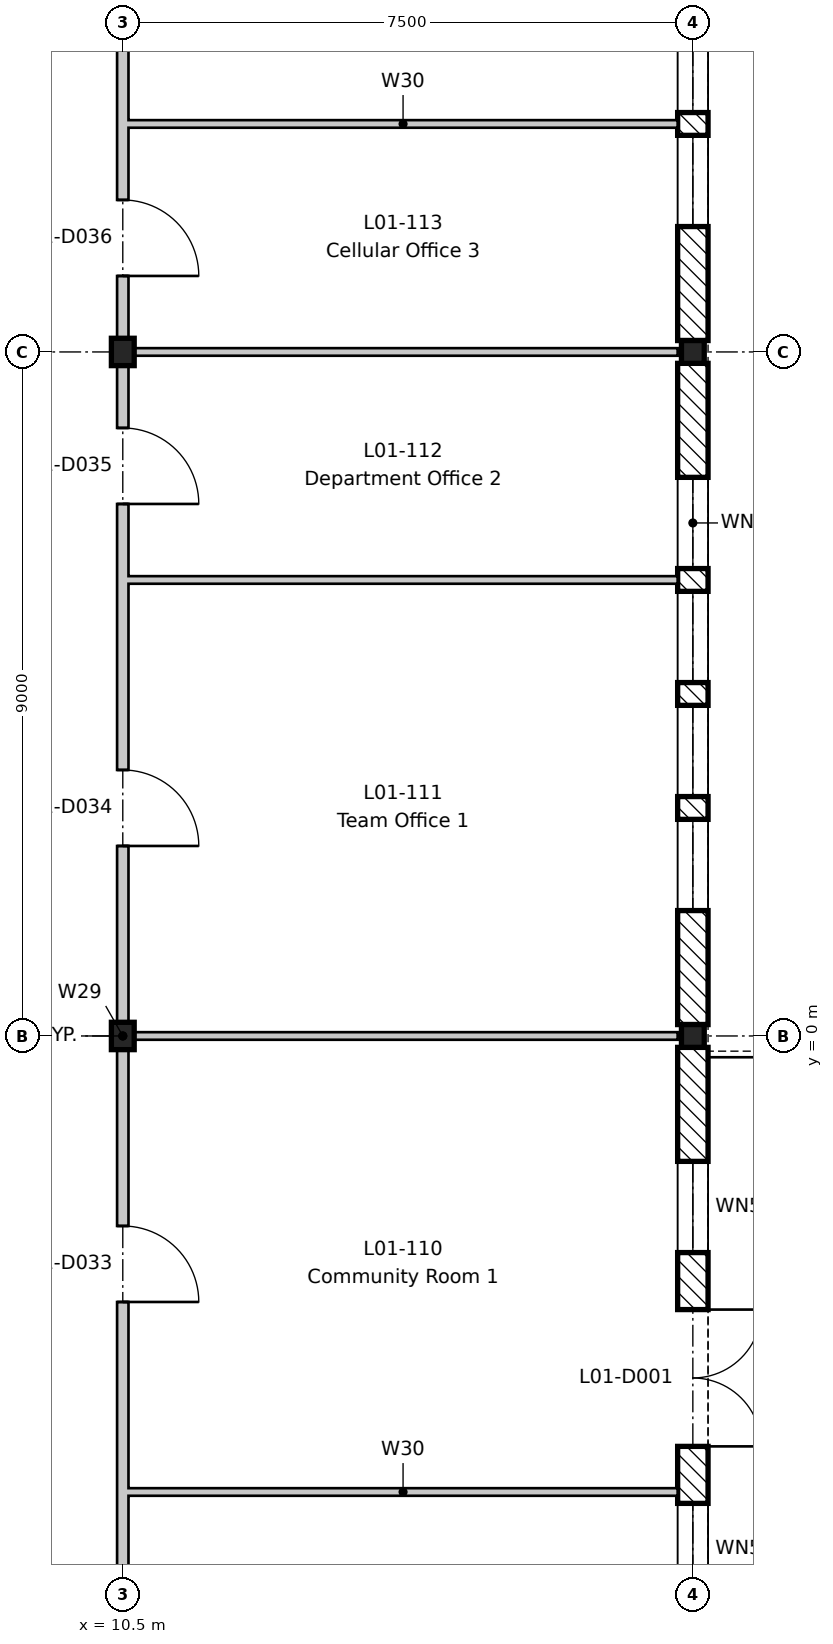
"""IFC4 building model, lengths in metres.
Left out: names, types, materials, properties, quantities, classifications, styles, units other than length and angle.
Written with IfcOpenShell. Run it as: python <this file> out.ifc"""

import sys

from ifc_helpers import new_model, si_unit, direction, frame, frame_2d, origin, origin_2d, place, context, subcontext, project, spatial, rectangle, i_section, extrude, element, fill, save


model = new_model("IFC4")
c1 = context("Model", 3, precision=1e-05, world=origin(), true_north=direction((0.0, 1.0)))
c2 = subcontext(c1, "Body", "Model", "MODEL_VIEW")
j1 = project(units=[si_unit("LENGTHUNIT", "METRE"), si_unit("PLANEANGLEUNIT", "RADIAN")], contexts=[c1])
p1 = place(None, origin())
s1 = spatial("IfcSite", under=j1, at=p1, CompositionType="ELEMENT")
p2 = place(p1, origin())
s2 = spatial("IfcBuilding", under=s1, at=p2, CompositionType="ELEMENT")
p3 = place(p2, frame((0.0, 0.0, 5.4)))
s3 = spatial("IfcBuildingStorey", under=s2, at=p3, CompositionType="ELEMENT", Elevation=5.4)
for number, where, z_axis, x_axis in (
    (1, (10.5, 0.0, -0.2), (0.0, 0.0, 1.0), (1.0, 0.0, 0.0)),
    (2, (10.5, 9.0, -0.2), (0.0, 0.0, 1.0), (1.0, 0.0, 0.0)),
):
    element("IfcColumn", number, at=place(p3, frame(where, z_axis=z_axis, x_axis=x_axis)), inside=s3, PredefinedType="COLUMN", context=c2, shape_type="SweptSolid", body=[
        extrude(i_section(OverallWidth=0.3, OverallDepth=0.36, WebThickness=0.012, FlangeThickness=0.022, FilletRadius=0.027, at=origin_2d()), origin(), (0.0, 0.0, 1.0), 4.5),
    ])
for number, where, z_axis, x_axis in (
    (3, (18.0, 0.0, -0.2), (0.0, 0.0, 1.0), (1.0, 0.0, 0.0)),
    (4, (18.0, 9.0, -0.2), (0.0, 0.0, 1.0), (1.0, 0.0, 0.0)),
):
    element("IfcColumn", number, at=place(p3, frame(where, z_axis=z_axis, x_axis=x_axis)), inside=s3, PredefinedType="COLUMN", context=c2, shape_type="SweptSolid", body=[
        extrude(i_section(OverallWidth=0.3, OverallDepth=0.3, WebThickness=0.011, FlangeThickness=0.019, FilletRadius=0.027, at=origin_2d()), origin(), (0.0, 0.0, 1.0), 4.5),
    ])
p4 = place(p3, frame((18.0, -0.15, 0.0), z_axis=(0.0, 0.0, 1.0), x_axis=(0.0, -1.0, 0.0)))
e5 = element("IfcWall", 5, at=p4, inside=s3, PredefinedType="STANDARD", context=c2, shape_type="SweptSolid", body=[
    extrude(rectangle(XDim=8.7, YDim=0.4, at=frame_2d((4.35, 0.0))), origin(), (0.0, 0.0, 1.0), 3.9),
])
p5 = place(p4, frame((3.45, 0.0, 0.0)))
e6 = element("IfcOpeningElement", 6, at=p5, cuts=e5, PredefinedType="OPENING", context=c2, shape_type="SweptSolid", body=[
    extrude(rectangle(XDim=1.8, YDim=2.4, at=frame_2d((0.9, 1.2))), frame((0.0, 0.21, 0.0), z_axis=(0.0, -1.0, 0.0), x_axis=(1.0, 0.0, 0.0)), (0.0, 0.0, 1.0), 0.42),
])
p6 = place(p4, frame((6.0, 0.0, 0.6)))
e7 = element("IfcOpeningElement", 7, at=p6, cuts=e5, PredefinedType="OPENING", context=c2, shape_type="SweptSolid", body=[
    extrude(rectangle(XDim=1.2, YDim=3.0, at=frame_2d((0.6, 1.5))), frame((0.0, 0.21, 0.0), z_axis=(0.0, -1.0, 0.0), x_axis=(1.0, 0.0, 0.0)), (0.0, 0.0, 1.0), 0.42),
])
p7 = place(p4, frame((1.5, 0.0, 0.6)))
e8 = element("IfcOpeningElement", 8, at=p7, cuts=e5, PredefinedType="OPENING", context=c2, shape_type="SweptSolid", body=[
    extrude(rectangle(XDim=1.2, YDim=3.0, at=frame_2d((0.6, 1.5))), frame((0.0, 0.21, 0.0), z_axis=(0.0, -1.0, 0.0), x_axis=(1.0, 0.0, 0.0)), (0.0, 0.0, 1.0), 0.42),
])
p8 = place(p3, frame((18.0, 8.85, 0.0), z_axis=(0.0, 0.0, 1.0), x_axis=(0.0, -1.0, 0.0)))
e9 = element("IfcWall", 9, at=p8, inside=s3, PredefinedType="STANDARD", context=c2, shape_type="SweptSolid", body=[
    extrude(rectangle(XDim=8.7, YDim=0.4, at=frame_2d((4.35, 0.0))), origin(), (0.0, 0.0, 1.0), 3.9),
])
p9 = place(p8, frame((6.0, 0.0, 0.6)))
e10 = element("IfcOpeningElement", 10, at=p9, cuts=e9, PredefinedType="OPENING", context=c2, shape_type="SweptSolid", body=[
    extrude(rectangle(XDim=1.2, YDim=3.0, at=frame_2d((0.6, 1.5))), frame((0.0, 0.21, 0.0), z_axis=(0.0, -1.0, 0.0), x_axis=(1.0, 0.0, 0.0)), (0.0, 0.0, 1.0), 0.42),
])
p10 = place(p8, frame((4.5, 0.0, 0.6)))
e11 = element("IfcOpeningElement", 11, at=p10, cuts=e9, PredefinedType="OPENING", context=c2, shape_type="SweptSolid", body=[
    extrude(rectangle(XDim=1.2, YDim=3.0, at=frame_2d((0.6, 1.5))), frame((0.0, 0.21, 0.0), z_axis=(0.0, -1.0, 0.0), x_axis=(1.0, 0.0, 0.0)), (0.0, 0.0, 1.0), 0.42),
])
p11 = place(p8, frame((3.0, 0.0, 0.6)))
e12 = element("IfcOpeningElement", 12, at=p11, cuts=e9, PredefinedType="OPENING", context=c2, shape_type="SweptSolid", body=[
    extrude(rectangle(XDim=1.2, YDim=3.0, at=frame_2d((0.6, 1.5))), frame((0.0, 0.21, 0.0), z_axis=(0.0, -1.0, 0.0), x_axis=(1.0, 0.0, 0.0)), (0.0, 0.0, 1.0), 0.42),
])
p12 = place(p8, frame((1.5, 0.0, 0.6)))
e13 = element("IfcOpeningElement", 13, at=p12, cuts=e9, PredefinedType="OPENING", context=c2, shape_type="SweptSolid", body=[
    extrude(rectangle(XDim=1.2, YDim=3.0, at=frame_2d((0.6, 1.5))), frame((0.0, 0.21, 0.0), z_axis=(0.0, -1.0, 0.0), x_axis=(1.0, 0.0, 0.0)), (0.0, 0.0, 1.0), 0.42),
])
p13 = place(p3, frame((18.0, 17.85, 0.0), z_axis=(0.0, 0.0, 1.0), x_axis=(0.0, -1.0, 0.0)))
e14 = element("IfcWall", 14, at=p13, inside=s3, PredefinedType="STANDARD", context=c2, shape_type="SweptSolid", body=[
    extrude(rectangle(XDim=8.7, YDim=0.4, at=frame_2d((4.35, 0.0))), origin(), (0.0, 0.0, 1.0), 3.9),
])
p14 = place(p13, frame((6.0, 0.0, 0.6)))
e15 = element("IfcOpeningElement", 15, at=p14, cuts=e14, PredefinedType="OPENING", context=c2, shape_type="SweptSolid", body=[
    extrude(rectangle(XDim=1.2, YDim=3.0, at=frame_2d((0.6, 1.5))), frame((0.0, 0.21, 0.0), z_axis=(0.0, -1.0, 0.0), x_axis=(1.0, 0.0, 0.0)), (0.0, 0.0, 1.0), 0.42),
])
p15 = place(p13, frame((4.5, 0.0, 0.6)))
e16 = element("IfcOpeningElement", 16, at=p15, cuts=e14, PredefinedType="OPENING", context=c2, shape_type="SweptSolid", body=[
    extrude(rectangle(XDim=1.2, YDim=3.0, at=frame_2d((0.6, 1.5))), frame((0.0, 0.21, 0.0), z_axis=(0.0, -1.0, 0.0), x_axis=(1.0, 0.0, 0.0)), (0.0, 0.0, 1.0), 0.42),
])
p16 = place(p13, frame((3.0, 0.0, 0.6)))
e17 = element("IfcOpeningElement", 17, at=p16, cuts=e14, PredefinedType="OPENING", context=c2, shape_type="SweptSolid", body=[
    extrude(rectangle(XDim=1.2, YDim=3.0, at=frame_2d((0.6, 1.5))), frame((0.0, 0.21, 0.0), z_axis=(0.0, -1.0, 0.0), x_axis=(1.0, 0.0, 0.0)), (0.0, 0.0, 1.0), 0.42),
])
p17 = place(p13, frame((1.5, 0.0, 0.6)))
e18 = element("IfcOpeningElement", 18, at=p17, cuts=e14, PredefinedType="OPENING", context=c2, shape_type="SweptSolid", body=[
    extrude(rectangle(XDim=1.2, YDim=3.0, at=frame_2d((0.6, 1.5))), frame((0.0, 0.21, 0.0), z_axis=(0.0, -1.0, 0.0), x_axis=(1.0, 0.0, 0.0)), (0.0, 0.0, 1.0), 0.42),
])
p18 = place(p3, frame((10.575, -6.0, 0.0), z_axis=(0.0, 0.0, 1.0), x_axis=(1.0, 0.0, 0.0)))
e19 = element("IfcWall", 19, at=p18, inside=s3, PredefinedType="PARTITIONING", context=c2, shape_type="SweptSolid", body=[
    extrude(rectangle(XDim=7.225, YDim=0.1, at=frame_2d((3.613, 0.0))), origin(), (0.0, 0.0, 1.0), 4.3),
])
p19 = place(p3, frame((10.575, 0.0, 0.0), z_axis=(0.0, 0.0, 1.0), x_axis=(1.0, 0.0, 0.0)))
e20 = element("IfcWall", 20, at=p19, inside=s3, PredefinedType="PARTITIONING", context=c2, shape_type="SweptSolid", body=[
    extrude(rectangle(XDim=7.225, YDim=0.1, at=frame_2d((3.613, 0.0))), origin(), (0.0, 0.0, 1.0), 3.95),
])
p20 = place(p3, frame((10.575, 6.0, 0.0), z_axis=(0.0, 0.0, 1.0), x_axis=(1.0, 0.0, 0.0)))
e21 = element("IfcWall", 21, at=p20, inside=s3, PredefinedType="PARTITIONING", context=c2, shape_type="SweptSolid", body=[
    extrude(rectangle(XDim=7.225, YDim=0.1, at=frame_2d((3.613, 0.0))), origin(), (0.0, 0.0, 1.0), 4.3),
])
p21 = place(p3, frame((10.575, 9.0, 0.0), z_axis=(0.0, 0.0, 1.0), x_axis=(1.0, 0.0, 0.0)))
e22 = element("IfcWall", 22, at=p21, inside=s3, PredefinedType="PARTITIONING", context=c2, shape_type="SweptSolid", body=[
    extrude(rectangle(XDim=7.225, YDim=0.1, at=frame_2d((3.613, 0.0))), origin(), (0.0, 0.0, 1.0), 3.95),
])
p22 = place(p3, frame((10.575, 12.0, 0.0), z_axis=(0.0, 0.0, 1.0), x_axis=(1.0, 0.0, 0.0)))
e23 = element("IfcWall", 23, at=p22, inside=s3, PredefinedType="PARTITIONING", context=c2, shape_type="SweptSolid", body=[
    extrude(rectangle(XDim=7.225, YDim=0.1, at=frame_2d((3.613, 0.0))), origin(), (0.0, 0.0, 1.0), 4.3),
])
p23 = place(p3, frame((10.5, -8.8, 0.0), z_axis=(0.0, 0.0, 1.0), x_axis=(0.0, 1.0, 0.0)))
e24 = element("IfcWall", 24, at=p23, inside=s3, PredefinedType="PARTITIONING", context=c2, shape_type="SweptSolid", body=[
    extrude(rectangle(XDim=79.3, YDim=0.15, at=frame_2d((39.65, 0.0))), origin(), (0.0, 0.0, 1.0), 3.78),
])
p24 = place(p23, frame((0.8, 0.0, 0.0)))
e25 = element("IfcOpeningElement", 25, at=p24, cuts=e24, PredefinedType="OPENING", context=c2, shape_type="SweptSolid", body=[
    extrude(rectangle(XDim=1.0, YDim=2.1, at=frame_2d((0.5, 1.05))), frame((0.0, 0.085, 0.0), z_axis=(0.0, -1.0, 0.0), x_axis=(1.0, 0.0, 0.0)), (0.0, 0.0, 1.0), 0.17),
])
p25 = place(p23, frame((5.3, 0.0, 0.0)))
e26 = element("IfcOpeningElement", 26, at=p25, cuts=e24, PredefinedType="OPENING", context=c2, shape_type="SweptSolid", body=[
    extrude(rectangle(XDim=1.0, YDim=2.1, at=frame_2d((0.5, 1.05))), frame((0.0, 0.085, 0.0), z_axis=(0.0, -1.0, 0.0), x_axis=(1.0, 0.0, 0.0)), (0.0, 0.0, 1.0), 0.17),
])
p26 = place(p23, frame((11.3, 0.0, 0.0)))
e27 = element("IfcOpeningElement", 27, at=p26, cuts=e24, PredefinedType="OPENING", context=c2, shape_type="SweptSolid", body=[
    extrude(rectangle(XDim=1.0, YDim=2.1, at=frame_2d((0.5, 1.05))), frame((0.0, 0.085, 0.0), z_axis=(0.0, -1.0, 0.0), x_axis=(1.0, 0.0, 0.0)), (0.0, 0.0, 1.0), 0.17),
])
p27 = place(p23, frame((15.8, 0.0, 0.0)))
e28 = element("IfcOpeningElement", 28, at=p27, cuts=e24, PredefinedType="OPENING", context=c2, shape_type="SweptSolid", body=[
    extrude(rectangle(XDim=1.0, YDim=2.1, at=frame_2d((0.5, 1.05))), frame((0.0, 0.085, 0.0), z_axis=(0.0, -1.0, 0.0), x_axis=(1.0, 0.0, 0.0)), (0.0, 0.0, 1.0), 0.17),
])
p28 = place(p23, frame((18.8, 0.0, 0.0)))
e29 = element("IfcOpeningElement", 29, at=p28, cuts=e24, PredefinedType="OPENING", context=c2, shape_type="SweptSolid", body=[
    extrude(rectangle(XDim=1.0, YDim=2.1, at=frame_2d((0.5, 1.05))), frame((0.0, 0.085, 0.0), z_axis=(0.0, -1.0, 0.0), x_axis=(1.0, 0.0, 0.0)), (0.0, 0.0, 1.0), 0.17),
])
p29 = place(p23, frame((23.3, 0.0, 0.0)))
e30 = element("IfcOpeningElement", 30, at=p29, cuts=e24, PredefinedType="OPENING", context=c2, shape_type="SweptSolid", body=[
    extrude(rectangle(XDim=1.0, YDim=2.1, at=frame_2d((0.5, 1.05))), frame((0.0, 0.085, 0.0), z_axis=(0.0, -1.0, 0.0), x_axis=(1.0, 0.0, 0.0)), (0.0, 0.0, 1.0), 0.17),
])
p30 = place(p23, frame((29.3, 0.0, 0.0)))
e31 = element("IfcOpeningElement", 31, at=p30, cuts=e24, PredefinedType="OPENING", context=c2, shape_type="SweptSolid", body=[
    extrude(rectangle(XDim=1.0, YDim=2.1, at=frame_2d((0.5, 1.05))), frame((0.0, 0.085, 0.0), z_axis=(0.0, -1.0, 0.0), x_axis=(1.0, 0.0, 0.0)), (0.0, 0.0, 1.0), 0.17),
])
p31 = place(p23, frame((33.8, 0.0, 0.0)))
e32 = element("IfcOpeningElement", 32, at=p31, cuts=e24, PredefinedType="OPENING", context=c2, shape_type="SweptSolid", body=[
    extrude(rectangle(XDim=1.0, YDim=2.1, at=frame_2d((0.5, 1.05))), frame((0.0, 0.085, 0.0), z_axis=(0.0, -1.0, 0.0), x_axis=(1.0, 0.0, 0.0)), (0.0, 0.0, 1.0), 0.17),
])
p32 = place(p23, frame((38.3, 0.0, 0.0)))
e33 = element("IfcOpeningElement", 33, at=p32, cuts=e24, PredefinedType="OPENING", context=c2, shape_type="SweptSolid", body=[
    extrude(rectangle(XDim=1.0, YDim=2.1, at=frame_2d((0.5, 1.05))), frame((0.0, 0.085, 0.0), z_axis=(0.0, -1.0, 0.0), x_axis=(1.0, 0.0, 0.0)), (0.0, 0.0, 1.0), 0.17),
])
p33 = place(p23, frame((42.8, 0.0, 0.0)))
e34 = element("IfcOpeningElement", 34, at=p33, cuts=e24, PredefinedType="OPENING", context=c2, shape_type="SweptSolid", body=[
    extrude(rectangle(XDim=1.0, YDim=2.1, at=frame_2d((0.5, 1.05))), frame((0.0, 0.085, 0.0), z_axis=(0.0, -1.0, 0.0), x_axis=(1.0, 0.0, 0.0)), (0.0, 0.0, 1.0), 0.17),
])
p34 = place(p23, frame((45.8, 0.0, 0.0)))
e35 = element("IfcOpeningElement", 35, at=p34, cuts=e24, PredefinedType="OPENING", context=c2, shape_type="SweptSolid", body=[
    extrude(rectangle(XDim=1.0, YDim=2.1, at=frame_2d((0.5, 1.05))), frame((0.0, 0.085, 0.0), z_axis=(0.0, -1.0, 0.0), x_axis=(1.0, 0.0, 0.0)), (0.0, 0.0, 1.0), 0.17),
])
p35 = place(p23, frame((50.3, 0.0, 0.0)))
e36 = element("IfcOpeningElement", 36, at=p35, cuts=e24, PredefinedType="OPENING", context=c2, shape_type="SweptSolid", body=[
    extrude(rectangle(XDim=1.0, YDim=2.1, at=frame_2d((0.5, 1.05))), frame((0.0, 0.085, 0.0), z_axis=(0.0, -1.0, 0.0), x_axis=(1.0, 0.0, 0.0)), (0.0, 0.0, 1.0), 0.17),
])
p36 = place(p23, frame((54.8, 0.0, 0.0)))
e37 = element("IfcOpeningElement", 37, at=p36, cuts=e24, PredefinedType="OPENING", context=c2, shape_type="SweptSolid", body=[
    extrude(rectangle(XDim=1.0, YDim=2.1, at=frame_2d((0.5, 1.05))), frame((0.0, 0.085, 0.0), z_axis=(0.0, -1.0, 0.0), x_axis=(1.0, 0.0, 0.0)), (0.0, 0.0, 1.0), 0.17),
])
p37 = place(p23, frame((57.8, 0.0, 0.0)))
e38 = element("IfcOpeningElement", 38, at=p37, cuts=e24, PredefinedType="OPENING", context=c2, shape_type="SweptSolid", body=[
    extrude(rectangle(XDim=1.0, YDim=2.1, at=frame_2d((0.5, 1.05))), frame((0.0, 0.085, 0.0), z_axis=(0.0, -1.0, 0.0), x_axis=(1.0, 0.0, 0.0)), (0.0, 0.0, 1.0), 0.17),
])
p38 = place(p23, frame((63.6, 0.0, 0.0)))
e39 = element("IfcOpeningElement", 39, at=p38, cuts=e24, PredefinedType="OPENING", context=c2, shape_type="SweptSolid", body=[
    extrude(rectangle(XDim=1.4, YDim=2.1, at=frame_2d((0.7, 1.05))), frame((0.0, 0.085, 0.0), z_axis=(0.0, -1.0, 0.0), x_axis=(1.0, 0.0, 0.0)), (0.0, 0.0, 1.0), 0.17),
])
p39 = place(p23, frame((69.8, 0.0, 0.0)))
e40 = element("IfcOpeningElement", 40, at=p39, cuts=e24, PredefinedType="OPENING", context=c2, shape_type="SweptSolid", body=[
    extrude(rectangle(XDim=1.0, YDim=2.1, at=frame_2d((0.5, 1.05))), frame((0.0, 0.085, 0.0), z_axis=(0.0, -1.0, 0.0), x_axis=(1.0, 0.0, 0.0)), (0.0, 0.0, 1.0), 0.17),
])
p40 = place(p23, frame((72.8, 0.0, 0.0)))
e41 = element("IfcOpeningElement", 41, at=p40, cuts=e24, PredefinedType="OPENING", context=c2, shape_type="SweptSolid", body=[
    extrude(rectangle(XDim=1.0, YDim=2.1, at=frame_2d((0.5, 1.05))), frame((0.0, 0.085, 0.0), z_axis=(0.0, -1.0, 0.0), x_axis=(1.0, 0.0, 0.0)), (0.0, 0.0, 1.0), 0.17),
])
p41 = place(p5, origin())
e42 = element("IfcDoor", 42, at=p41, inside=s3, OperationType="DOUBLE_DOOR_SINGLE_SWING", PredefinedType="DOOR", context=c2, shape_type="SweptSolid", body=[
    extrude(rectangle(XDim=1.8, YDim=2.4, at=frame_2d((0.9, 1.2))), frame((0.0, 0.025, 0.0), z_axis=(0.0, -1.0, 0.0), x_axis=(1.0, 0.0, 0.0)), (0.0, 0.0, 1.0), 0.05),
])
fill(e6, e42)
p42 = place(p6, origin())
e43 = element("IfcWindow", 43, at=p42, inside=s3, PartitioningType="SINGLE_PANEL", PredefinedType="WINDOW", context=c2, shape_type="SweptSolid", body=[
    extrude(rectangle(XDim=1.2, YDim=3.0, at=frame_2d((0.6, 1.5))), frame((0.0, 0.03, 0.0), z_axis=(0.0, -1.0, 0.0), x_axis=(1.0, 0.0, 0.0)), (0.0, 0.0, 1.0), 0.06),
])
fill(e7, e43)
p43 = place(p7, origin())
e44 = element("IfcWindow", 44, at=p43, inside=s3, PartitioningType="SINGLE_PANEL", PredefinedType="WINDOW", context=c2, shape_type="SweptSolid", body=[
    extrude(rectangle(XDim=1.2, YDim=3.0, at=frame_2d((0.6, 1.5))), frame((0.0, 0.03, 0.0), z_axis=(0.0, -1.0, 0.0), x_axis=(1.0, 0.0, 0.0)), (0.0, 0.0, 1.0), 0.06),
])
fill(e8, e44)
p44 = place(p9, origin())
e45 = element("IfcWindow", 45, at=p44, inside=s3, PartitioningType="SINGLE_PANEL", PredefinedType="WINDOW", context=c2, shape_type="SweptSolid", body=[
    extrude(rectangle(XDim=1.2, YDim=3.0, at=frame_2d((0.6, 1.5))), frame((0.0, 0.03, 0.0), z_axis=(0.0, -1.0, 0.0), x_axis=(1.0, 0.0, 0.0)), (0.0, 0.0, 1.0), 0.06),
])
fill(e10, e45)
p45 = place(p10, origin())
e46 = element("IfcWindow", 46, at=p45, inside=s3, PartitioningType="SINGLE_PANEL", PredefinedType="WINDOW", context=c2, shape_type="SweptSolid", body=[
    extrude(rectangle(XDim=1.2, YDim=3.0, at=frame_2d((0.6, 1.5))), frame((0.0, 0.03, 0.0), z_axis=(0.0, -1.0, 0.0), x_axis=(1.0, 0.0, 0.0)), (0.0, 0.0, 1.0), 0.06),
])
fill(e11, e46)
p46 = place(p11, origin())
e47 = element("IfcWindow", 47, at=p46, inside=s3, PartitioningType="SINGLE_PANEL", PredefinedType="WINDOW", context=c2, shape_type="SweptSolid", body=[
    extrude(rectangle(XDim=1.2, YDim=3.0, at=frame_2d((0.6, 1.5))), frame((0.0, 0.03, 0.0), z_axis=(0.0, -1.0, 0.0), x_axis=(1.0, 0.0, 0.0)), (0.0, 0.0, 1.0), 0.06),
])
fill(e12, e47)
p47 = place(p12, origin())
e48 = element("IfcWindow", 48, at=p47, inside=s3, PartitioningType="SINGLE_PANEL", PredefinedType="WINDOW", context=c2, shape_type="SweptSolid", body=[
    extrude(rectangle(XDim=1.2, YDim=3.0, at=frame_2d((0.6, 1.5))), frame((0.0, 0.03, 0.0), z_axis=(0.0, -1.0, 0.0), x_axis=(1.0, 0.0, 0.0)), (0.0, 0.0, 1.0), 0.06),
])
fill(e13, e48)
p48 = place(p14, origin())
e49 = element("IfcWindow", 49, at=p48, inside=s3, PartitioningType="SINGLE_PANEL", PredefinedType="WINDOW", context=c2, shape_type="SweptSolid", body=[
    extrude(rectangle(XDim=1.2, YDim=3.0, at=frame_2d((0.6, 1.5))), frame((0.0, 0.03, 0.0), z_axis=(0.0, -1.0, 0.0), x_axis=(1.0, 0.0, 0.0)), (0.0, 0.0, 1.0), 0.06),
])
fill(e15, e49)
p49 = place(p15, origin())
e50 = element("IfcWindow", 50, at=p49, inside=s3, PartitioningType="SINGLE_PANEL", PredefinedType="WINDOW", context=c2, shape_type="SweptSolid", body=[
    extrude(rectangle(XDim=1.2, YDim=3.0, at=frame_2d((0.6, 1.5))), frame((0.0, 0.03, 0.0), z_axis=(0.0, -1.0, 0.0), x_axis=(1.0, 0.0, 0.0)), (0.0, 0.0, 1.0), 0.06),
])
fill(e16, e50)
p50 = place(p25, frame((1.0, 0.0, 0.0), z_axis=(0.0, 0.0, 1.0), x_axis=(-1.0, 0.0, 0.0)))
e51 = element("IfcDoor", 51, at=p50, inside=s3, OperationType="SINGLE_SWING_RIGHT", PredefinedType="DOOR", context=c2, shape_type="SweptSolid", body=[
    extrude(rectangle(XDim=1.0, YDim=2.1, at=frame_2d((0.5, 1.05))), frame((0.0, 0.025, 0.0), z_axis=(0.0, -1.0, 0.0), x_axis=(1.0, 0.0, 0.0)), (0.0, 0.0, 1.0), 0.05),
])
fill(e26, e51)
p51 = place(p26, frame((1.0, 0.0, 0.0), z_axis=(0.0, 0.0, 1.0), x_axis=(-1.0, 0.0, 0.0)))
e52 = element("IfcDoor", 52, at=p51, inside=s3, OperationType="SINGLE_SWING_RIGHT", PredefinedType="DOOR", context=c2, shape_type="SweptSolid", body=[
    extrude(rectangle(XDim=1.0, YDim=2.1, at=frame_2d((0.5, 1.05))), frame((0.0, 0.025, 0.0), z_axis=(0.0, -1.0, 0.0), x_axis=(1.0, 0.0, 0.0)), (0.0, 0.0, 1.0), 0.05),
])
fill(e27, e52)
p52 = place(p27, frame((1.0, 0.0, 0.0), z_axis=(0.0, 0.0, 1.0), x_axis=(-1.0, 0.0, 0.0)))
e53 = element("IfcDoor", 53, at=p52, inside=s3, OperationType="SINGLE_SWING_RIGHT", PredefinedType="DOOR", context=c2, shape_type="SweptSolid", body=[
    extrude(rectangle(XDim=1.0, YDim=2.1, at=frame_2d((0.5, 1.05))), frame((0.0, 0.025, 0.0), z_axis=(0.0, -1.0, 0.0), x_axis=(1.0, 0.0, 0.0)), (0.0, 0.0, 1.0), 0.05),
])
fill(e28, e53)
p53 = place(p28, frame((1.0, 0.0, 0.0), z_axis=(0.0, 0.0, 1.0), x_axis=(-1.0, 0.0, 0.0)))
e54 = element("IfcDoor", 54, at=p53, inside=s3, OperationType="SINGLE_SWING_RIGHT", PredefinedType="DOOR", context=c2, shape_type="SweptSolid", body=[
    extrude(rectangle(XDim=1.0, YDim=2.1, at=frame_2d((0.5, 1.05))), frame((0.0, 0.025, 0.0), z_axis=(0.0, -1.0, 0.0), x_axis=(1.0, 0.0, 0.0)), (0.0, 0.0, 1.0), 0.05),
])
fill(e29, e54)
save(model, sys.argv[1])
